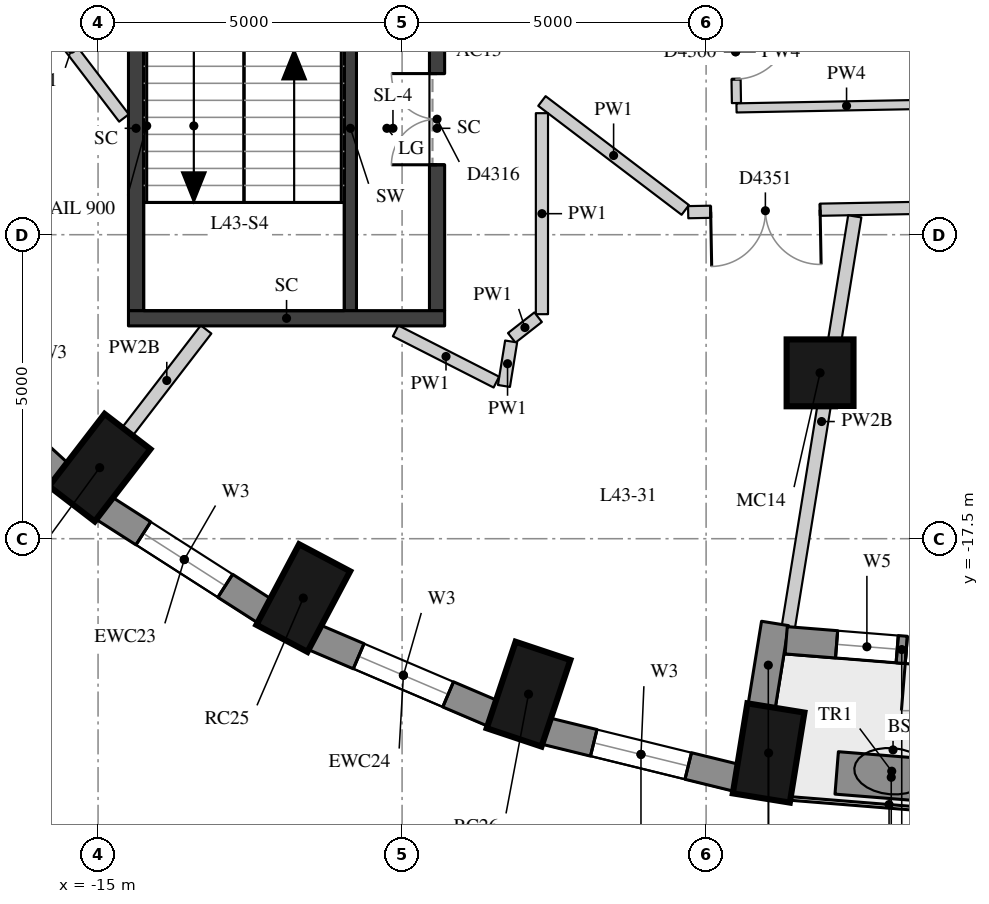
"""IFC4 building model, lengths in metres.
Left out: names, types, materials, properties, quantities, classifications, styles, units other than length and angle.
Written with IfcOpenShell. Run it as: python <this file> out.ifc"""

import sys

from ifc_helpers import new_model, si_unit, direction, frame, frame_2d, origin, origin_2d, place, context, subcontext, project, spatial, rectangle, extrude, element, fill, save


model = new_model("IFC4")
c1 = context("Model", 3, precision=1e-05, world=origin(), true_north=direction((0.0, 1.0)))
c2 = subcontext(c1, "Body", "Model", "MODEL_VIEW")
j1 = project(units=[si_unit("LENGTHUNIT", "METRE"), si_unit("PLANEANGLEUNIT", "RADIAN")], contexts=[c1])
p1 = place(None, origin())
s1 = spatial("IfcSite", under=j1, at=p1, CompositionType="ELEMENT")
p2 = place(p1, origin())
s2 = spatial("IfcBuilding", under=s1, at=p2, CompositionType="ELEMENT")
p3 = place(p2, frame((0.0, 0.0, 155.0)))
s3 = spatial("IfcBuildingStorey", under=s2, at=p3, CompositionType="ELEMENT", Elevation=155.0)
for number, where, z_axis, x_axis in (
    (1, (-14.973, -16.332, 0.0), (0.0, 0.0, 1.0), (-0.61, -0.792, 0.0)),
    (2, (-11.625, -18.476, 0.0), (0.0, 0.0, 1.0), (-0.468, -0.884, 0.0)),
    (3, (-7.92, -20.056, 0.0), (0.0, 0.0, 1.0), (-0.317, -0.949, 0.0)),
    (4, (-3.972, -21.024, 0.0), (0.0, 0.0, 1.0), (-0.16, -0.987, 0.0)),
):
    element("IfcColumn", number, at=place(p3, frame(where, z_axis=z_axis, x_axis=x_axis)), inside=s3, PredefinedType="COLUMN", context=c2, shape_type="SweptSolid", body=[
        extrude(rectangle(XDim=1.5, YDim=0.95, at=origin_2d()), origin(), (0.0, 0.0, 1.0), 3.3),
    ])
p4 = place(p3, frame((-3.126, -14.772, 0.0), z_axis=(0.0, 0.0, 1.0), x_axis=(1.0, 0.0, 0.0)))
e5 = element("IfcColumn", 5, at=p4, inside=s3, PredefinedType="COLUMN", context=c2, shape_type="SweptSolid", body=[
    extrude(rectangle(XDim=1.1, YDim=1.1, at=origin_2d()), origin(), (0.0, 0.0, 1.0), 3.3),
])
p5 = place(p3, frame((-17.913, -14.35, 0.0), z_axis=(0.0, 0.0, 1.0), x_axis=(0.737808755941, -0.675009807082, 0.0)))
e6 = element("IfcWall", 6, at=p5, inside=s3, PredefinedType="SOLIDWALL", context=c2, shape_type="SweptSolid", body=[
    extrude(rectangle(XDim=3.094, YDim=0.45, at=frame_2d((1.547, 0.0))), origin(), (0.0, 0.0, 1.0), 3.02),
])
p6 = place(p5, frame((0.747, 0.0, 0.4)))
e7 = element("IfcOpeningElement", 7, at=p6, cuts=e6, PredefinedType="OPENING", context=c2, shape_type="SweptSolid", body=[
    extrude(rectangle(XDim=1.6, YDim=1.75, at=frame_2d((0.8, 0.875))), frame((0.0, 0.235, 0.0), z_axis=(0.0, -1.0, 0.0), x_axis=(1.0, 0.0, 0.0)), (0.0, 0.0, 1.0), 0.47),
])
p7 = place(p3, frame((-14.908, -16.993, 0.0), z_axis=(0.0, 0.0, 1.0), x_axis=(0.842065914439, -0.539374633943, 0.0)))
e8 = element("IfcWall", 8, at=p7, inside=s3, PredefinedType="SOLIDWALL", context=c2, shape_type="SweptSolid", body=[
    extrude(rectangle(XDim=3.151, YDim=0.45, at=frame_2d((1.576, 0.0))), origin(), (0.0, 0.0, 1.0), 3.02),
])
p8 = place(p7, frame((0.776, 0.0, 0.4)))
e9 = element("IfcOpeningElement", 9, at=p8, cuts=e8, PredefinedType="OPENING", context=c2, shape_type="SweptSolid", body=[
    extrude(rectangle(XDim=1.6, YDim=1.75, at=frame_2d((0.8, 0.875))), frame((0.0, 0.235, 0.0), z_axis=(0.0, -1.0, 0.0), x_axis=(1.0, 0.0, 0.0)), (0.0, 0.0, 1.0), 0.47),
])
p9 = place(p3, frame((-11.45, -19.119, 0.0), z_axis=(0.0, 0.0, 1.0), x_axis=(0.919798725687, -0.392390499663, 0.0)))
e10 = element("IfcWall", 10, at=p9, inside=s3, PredefinedType="SOLIDWALL", context=c2, shape_type="SweptSolid", body=[
    extrude(rectangle(XDim=3.2, YDim=0.45, at=frame_2d((1.6, 0.0))), origin(), (0.0, 0.0, 1.0), 3.02),
])
p10 = place(p9, frame((0.8, 0.0, 0.4)))
e11 = element("IfcOpeningElement", 11, at=p10, cuts=e10, PredefinedType="OPENING", context=c2, shape_type="SweptSolid", body=[
    extrude(rectangle(XDim=1.6, YDim=1.75, at=frame_2d((0.8, 0.875))), frame((0.0, 0.235, 0.0), z_axis=(0.0, -1.0, 0.0), x_axis=(1.0, 0.0, 0.0)), (0.0, 0.0, 1.0), 0.47),
])
p11 = place(p3, frame((-7.643, -20.662, 0.0), z_axis=(0.0, 0.0, 1.0), x_axis=(0.971232901476, -0.238131583563, 0.0)))
e12 = element("IfcWall", 12, at=p11, inside=s3, PredefinedType="SOLIDWALL", context=c2, shape_type="SweptSolid", body=[
    extrude(rectangle(XDim=3.237, YDim=0.45, at=frame_2d((1.618, 0.0))), origin(), (0.0, 0.0, 1.0), 3.02),
])
p12 = place(p11, frame((0.818, 0.0, 0.4)))
e13 = element("IfcOpeningElement", 13, at=p12, cuts=e12, PredefinedType="OPENING", context=c2, shape_type="SweptSolid", body=[
    extrude(rectangle(XDim=1.6, YDim=1.75, at=frame_2d((0.8, 0.875))), frame((0.0, 0.235, 0.0), z_axis=(0.0, -1.0, 0.0), x_axis=(1.0, 0.0, 0.0)), (0.0, 0.0, 1.0), 0.47),
])
p13 = place(p3, frame((-4.088, -20.266, 0.0), z_axis=(0.0, 0.0, 1.0), x_axis=(0.159641024018, 0.98717513312, 0.0)))
e14 = element("IfcWall", 14, at=p13, inside=s3, PredefinedType="SOLIDWALL", context=c2, shape_type="SweptSolid", body=[
    extrude(rectangle(XDim=1.39, YDim=0.45, at=frame_2d((0.695, 0.0))), origin(), (0.0, 0.0, 1.0), 2.57),
])
p14 = place(p3, frame((-3.683, -19.171, 0.0), z_axis=(0.0, 0.0, 1.0), x_axis=(0.996792437449, -0.080030223316, 0.0)))
e15 = element("IfcWall", 15, at=p14, inside=s3, PredefinedType="SOLIDWALL", context=c2, shape_type="SweptSolid", body=[
    extrude(rectangle(XDim=3.813, YDim=0.45, at=frame_2d((1.907, 0.0))), origin(), (0.0, 0.0, 1.0), 3.02),
])
p15 = place(p14, frame((0.832, 0.0, 0.4)))
e16 = element("IfcOpeningElement", 16, at=p15, cuts=e15, PredefinedType="OPENING", context=c2, shape_type="SweptSolid", body=[
    extrude(rectangle(XDim=1.0, YDim=1.75, at=frame_2d((0.5, 0.875))), frame((0.0, 0.235, 0.0), z_axis=(0.0, -1.0, 0.0), x_axis=(1.0, 0.0, 0.0)), (0.0, 0.0, 1.0), 0.47),
])
p16 = place(p14, frame((1.982, 0.0, 0.0)))
e17 = element("IfcOpeningElement", 17, at=p16, cuts=e15, PredefinedType="OPENING", context=c2, shape_type="SweptSolid", body=[
    extrude(rectangle(XDim=1.0, YDim=2.15, at=frame_2d((0.5, 1.075))), frame((0.0, 0.235, 0.0), z_axis=(0.0, -1.0, 0.0), x_axis=(1.0, 0.0, 0.0)), (0.0, 0.0, 1.0), 0.47),
])
p17 = place(p3, frame((-2.852, -21.352, 0.0), z_axis=(0.0, 0.0, 1.0), x_axis=(0.996814415906, -0.07975600443, 0.0)))
e18 = element("IfcWall", 18, at=p17, inside=s3, PredefinedType="USERDEFINED", context=c2, shape_type="SweptSolid", body=[
    extrude(rectangle(XDim=1.8, YDim=0.7, at=frame_2d((0.9, 0.0))), origin(), (0.0, 0.0, 1.0), 0.75),
])
p18 = place(p3, frame((-10.85, -13.75, 0.0), z_axis=(0.0, 0.0, 1.0), x_axis=(0.0, 1.0, 0.0)))
e19 = element("IfcWall", 19, at=p18, inside=s3, PredefinedType="SHEAR", context=c2, shape_type="SweptSolid", body=[
    extrude(rectangle(XDim=6.0, YDim=0.2, at=frame_2d((3.0, 0.0))), origin(), (0.0, 0.0, 1.0), 3.02),
])
p19 = place(p18, frame((4.4, 0.0, 0.0)))
e20 = element("IfcOpeningElement", 20, at=p19, cuts=e19, PredefinedType="OPENING", context=c2, shape_type="SweptSolid", body=[
    extrude(rectangle(XDim=1.5, YDim=2.1, at=frame_2d((0.75, 1.05))), frame((0.0, 0.11, 0.0), z_axis=(0.0, -1.0, 0.0), x_axis=(1.0, 0.0, 0.0)), (0.0, 0.0, 1.0), 0.22),
])
p20 = place(p3, frame((-14.375, -13.75, -0.28), z_axis=(0.0, 0.0, 1.0), x_axis=(0.0, 1.0, 0.0)))
e21 = element("IfcWall", 21, at=p20, inside=s3, PredefinedType="SHEAR", context=c2, shape_type="SweptSolid", body=[
    extrude(rectangle(XDim=6.0, YDim=0.25, at=frame_2d((3.0, 0.0))), origin(), (0.0, 0.0, 1.0), 3.3),
])
p21 = place(p3, frame((-9.425, -13.75, -0.28), z_axis=(0.0, 0.0, 1.0), x_axis=(0.0, 1.0, 0.0)))
e22 = element("IfcWall", 22, at=p21, inside=s3, PredefinedType="SHEAR", context=c2, shape_type="SweptSolid", body=[
    extrude(rectangle(XDim=6.0, YDim=0.25, at=frame_2d((3.0, 0.0))), origin(), (0.0, 0.0, 1.0), 3.3),
])
p22 = place(p21, frame((2.4, 0.0, 0.28)))
e23 = element("IfcOpeningElement", 23, at=p22, cuts=e22, PredefinedType="OPENING", context=c2, shape_type="SweptSolid", body=[
    extrude(rectangle(XDim=1.5, YDim=2.1, at=frame_2d((0.75, 1.05))), frame((0.0, 0.135, 0.0), z_axis=(0.0, -1.0, 0.0), x_axis=(1.0, 0.0, 0.0)), (0.0, 0.0, 1.0), 0.27),
])
p23 = place(p3, frame((-14.5, -13.875, -0.28), z_axis=(0.0, 0.0, 1.0), x_axis=(1.0, 0.0, 0.0)))
e24 = element("IfcWall", 24, at=p23, inside=s3, PredefinedType="SHEAR", context=c2, shape_type="SweptSolid", body=[
    extrude(rectangle(XDim=5.2, YDim=0.25, at=frame_2d((2.6, 0.0))), origin(), (0.0, 0.0, 1.0), 3.3),
])
p24 = place(p3, frame((17.6, -11.702, 0.0), z_axis=(0.0, 0.0, 1.0), x_axis=(-0.999825923551, -0.018658043723, 0.0)))
e25 = element("IfcWall", 25, at=p24, inside=s3, PredefinedType="PARTITIONING", context=c2, shape_type="SweptSolid", body=[
    extrude(rectangle(XDim=22.899, YDim=0.2, at=frame_2d((11.449, 0.0))), origin(), (0.0, 0.0, 1.0), 3.02),
])
p25 = place(p24, frame((20.729, 0.0, 0.0)))
e26 = element("IfcOpeningElement", 26, at=p25, cuts=e25, PredefinedType="OPENING", context=c2, shape_type="SweptSolid", body=[
    extrude(rectangle(XDim=1.8, YDim=2.1, at=frame_2d((0.9, 1.05))), frame((0.0, 0.11, 0.0), z_axis=(0.0, -1.0, 0.0), x_axis=(1.0, 0.0, 0.0)), (0.0, 0.0, 1.0), 0.22),
])
p26 = place(p24, frame((14.554, 0.0, 0.0)))
e27 = element("IfcOpeningElement", 27, at=p26, cuts=e25, PredefinedType="OPENING", context=c2, shape_type="SweptSolid", body=[
    extrude(rectangle(XDim=1.1, YDim=2.1, at=frame_2d((0.55, 1.05))), frame((0.0, 0.11, 0.0), z_axis=(0.0, -1.0, 0.0), x_axis=(1.0, 0.0, 0.0)), (0.0, 0.0, 1.0), 0.22),
])
p27 = place(p24, frame((8.491, 0.0, 0.0)))
e28 = element("IfcOpeningElement", 28, at=p27, cuts=e25, PredefinedType="OPENING", context=c2, shape_type="SweptSolid", body=[
    extrude(rectangle(XDim=1.1, YDim=2.1, at=frame_2d((0.55, 1.05))), frame((0.0, 0.11, 0.0), z_axis=(0.0, -1.0, 0.0), x_axis=(1.0, 0.0, 0.0)), (0.0, 0.0, 1.0), 0.22),
])
p28 = place(p3, frame((-5.343, -12.093, 0.0), z_axis=(0.0, 0.0, 1.0), x_axis=(-0.796104996328, 0.605158520407, 0.0)))
e29 = element("IfcWall", 29, at=p28, inside=s3, PredefinedType="PARTITIONING", context=c2, shape_type="SweptSolid", body=[
    extrude(rectangle(XDim=2.961, YDim=0.2, at=frame_2d((1.48, 0.0))), origin(), (0.0, 0.0, 1.0), 3.02),
])
p29 = place(p3, frame((-7.7, -10.501, 0.0), z_axis=(0.0, 0.0, 1.0), x_axis=(0.0, -1.0, 0.0)))
e30 = element("IfcWall", 30, at=p29, inside=s3, PredefinedType="PARTITIONING", context=c2, shape_type="SweptSolid", body=[
    extrude(rectangle(XDim=3.306, YDim=0.2, at=frame_2d((1.653, 0.0))), origin(), (0.0, 0.0, 1.0), 3.02),
])
p30 = place(p3, frame((-7.762, -13.857, 0.0), z_axis=(0.0, 0.0, 1.0), x_axis=(-0.787561048704, -0.616236638447, 0.0)))
e31 = element("IfcWall", 31, at=p30, inside=s3, PredefinedType="PARTITIONING", context=c2, shape_type="SweptSolid", body=[
    extrude(rectangle(XDim=0.552, YDim=0.2, at=frame_2d((0.276, 0.0))), origin(), (0.0, 0.0, 1.0), 3.02),
])
p31 = place(p3, frame((-8.206, -14.256, 0.0), z_axis=(0.0, 0.0, 1.0), x_axis=(-0.159750207899, -0.987157470253, 0.0)))
e32 = element("IfcWall", 32, at=p31, inside=s3, PredefinedType="PARTITIONING", context=c2, shape_type="SweptSolid", body=[
    extrude(rectangle(XDim=0.741, YDim=0.2, at=frame_2d((0.371, 0.0))), origin(), (0.0, 0.0, 1.0), 3.02),
])
p32 = place(p3, frame((-8.449, -14.925, 0.0), z_axis=(0.0, 0.0, 1.0), x_axis=(-0.891172770552, 0.45366407509, 0.0)))
e33 = element("IfcWall", 33, at=p32, inside=s3, PredefinedType="PARTITIONING", context=c2, shape_type="SweptSolid", body=[
    extrude(rectangle(XDim=1.859, YDim=0.2, at=frame_2d((0.929, 0.0))), origin(), (0.0, 0.0, 1.0), 3.02),
])
p33 = place(p3, frame((-14.574, -10.58, 0.0), z_axis=(0.0, 0.0, 1.0), x_axis=(-0.606733250298, 0.794905505694, 0.0)))
e34 = element("IfcWall", 34, at=p33, inside=s3, PredefinedType="PARTITIONING", context=c2, shape_type="SweptSolid", body=[
    extrude(rectangle(XDim=2.845, YDim=0.2, at=frame_2d((1.423, 0.0))), origin(), (0.0, 0.0, 1.0), 3.02),
])
p34 = place(p33, frame((1.805, 0.0, 0.0)))
e35 = element("IfcOpeningElement", 35, at=p34, cuts=e34, PredefinedType="OPENING", context=c2, shape_type="SweptSolid", body=[
    extrude(rectangle(XDim=0.9, YDim=2.1, at=frame_2d((0.45, 1.05))), frame((0.0, 0.11, 0.0), z_axis=(0.0, -1.0, 0.0), x_axis=(1.0, 0.0, 0.0)), (0.0, 0.0, 1.0), 0.22),
])
p35 = place(p3, frame((-0.88, -10.347, 0.0), z_axis=(0.0, 0.0, 1.0), x_axis=(-0.999826791681, -0.018611465199, 0.0)))
e36 = element("IfcWall", 36, at=p35, inside=s3, PredefinedType="PARTITIONING", context=c2, shape_type="SweptSolid", body=[
    extrude(rectangle(XDim=3.621, YDim=0.15, at=frame_2d((1.81, 0.0))), origin(), (0.0, 0.0, 1.0), 3.02),
])
p36 = place(p3, frame((-4.501, -10.334, 0.0), z_axis=(0.0, 0.0, 1.0), x_axis=(-0.015785981736, 0.999875393627, 0.0)))
e37 = element("IfcWall", 37, at=p36, inside=s3, PredefinedType="PARTITIONING", context=c2, shape_type="SweptSolid", body=[
    extrude(rectangle(XDim=1.686, YDim=0.15, at=frame_2d((0.843, 0.0))), origin(), (0.0, 0.0, 1.0), 3.02),
])
p37 = place(p36, frame((0.393, 0.0, 0.0)))
e38 = element("IfcOpeningElement", 38, at=p37, cuts=e37, PredefinedType="OPENING", context=c2, shape_type="SweptSolid", body=[
    extrude(rectangle(XDim=0.9, YDim=2.1, at=frame_2d((0.45, 1.05))), frame((0.0, 0.085, 0.0), z_axis=(0.0, -1.0, 0.0), x_axis=(1.0, 0.0, 0.0)), (0.0, 0.0, 1.0), 0.17),
])
p38 = place(p3, frame((-14.516, -15.737, 0.0), z_axis=(0.0, 0.0, 1.0), x_axis=(0.609983624648, 0.792414019097, 0.0)))
e39 = element("IfcWall", 39, at=p38, inside=s3, PredefinedType="PARTITIONING", context=c2, shape_type="SweptSolid", body=[
    extrude(rectangle(XDim=2.118, YDim=0.22, at=frame_2d((1.059, 0.0))), origin(), (0.0, 0.0, 1.0), 2.57),
])
p39 = place(p3, frame((-3.647, -18.948, 0.0), z_axis=(0.0, 0.0, 1.0), x_axis=(0.159718523375, 0.98716259719, 0.0)))
e40 = element("IfcWall", 40, at=p39, inside=s3, PredefinedType="PARTITIONING", context=c2, shape_type="SweptSolid", body=[
    extrude(rectangle(XDim=6.837, YDim=0.22, at=frame_2d((3.419, 0.0))), origin(), (0.0, 0.0, 1.0), 2.57),
])
p40 = place(p8, origin())
e41 = element("IfcWindow", 41, at=p40, inside=s3, PartitioningType="SINGLE_PANEL", PredefinedType="WINDOW", context=c2, shape_type="SweptSolid", body=[
    extrude(rectangle(XDim=1.6, YDim=1.75, at=frame_2d((0.8, 0.875))), frame((0.0, 0.035, 0.0), z_axis=(0.0, -1.0, 0.0), x_axis=(1.0, 0.0, 0.0)), (0.0, 0.0, 1.0), 0.06),
])
fill(e9, e41)
p41 = place(p10, origin())
e42 = element("IfcWindow", 42, at=p41, inside=s3, PartitioningType="SINGLE_PANEL", PredefinedType="WINDOW", context=c2, shape_type="SweptSolid", body=[
    extrude(rectangle(XDim=1.6, YDim=1.75, at=frame_2d((0.8, 0.875))), frame((0.0, 0.035, 0.0), z_axis=(0.0, -1.0, 0.0), x_axis=(1.0, 0.0, 0.0)), (0.0, 0.0, 1.0), 0.06),
])
fill(e11, e42)
p42 = place(p12, origin())
e43 = element("IfcWindow", 43, at=p42, inside=s3, PartitioningType="SINGLE_PANEL", PredefinedType="WINDOW", context=c2, shape_type="SweptSolid", body=[
    extrude(rectangle(XDim=1.6, YDim=1.75, at=frame_2d((0.8, 0.875))), frame((0.0, 0.035, 0.0), z_axis=(0.0, -1.0, 0.0), x_axis=(1.0, 0.0, 0.0)), (0.0, 0.0, 1.0), 0.06),
])
fill(e13, e43)
p43 = place(p15, origin())
e44 = element("IfcWindow", 44, at=p43, inside=s3, PartitioningType="SINGLE_PANEL", PredefinedType="WINDOW", context=c2, shape_type="SweptSolid", body=[
    extrude(rectangle(XDim=1.0, YDim=1.75, at=frame_2d((0.5, 0.875))), frame((0.0, 0.035, 0.0), z_axis=(0.0, -1.0, 0.0), x_axis=(1.0, 0.0, 0.0)), (0.0, 0.0, 1.0), 0.06),
])
fill(e16, e44)
p44 = place(p16, frame((1.0, 0.0, 0.0), z_axis=(0.0, 0.0, 1.0), x_axis=(-1.0, 0.0, 0.0)))
e45 = element("IfcDoor", 45, at=p44, inside=s3, OperationType="SINGLE_SWING_RIGHT", PredefinedType="DOOR", context=c2, shape_type="SweptSolid", body=[
    extrude(rectangle(XDim=1.0, YDim=2.15, at=frame_2d((0.5, 1.075))), frame((0.0, 0.075, 0.0), z_axis=(0.0, -1.0, 0.0), x_axis=(1.0, 0.0, 0.0)), (0.0, 0.0, 1.0), 0.05),
])
fill(e17, e45)
p45 = place(p22, origin())
e46 = element("IfcDoor", 46, at=p45, inside=s3, OperationType="DOUBLE_DOOR_SINGLE_SWING", PredefinedType="DOOR", context=c2, shape_type="SweptSolid", body=[
    extrude(rectangle(XDim=1.5, YDim=2.1, at=frame_2d((0.75, 1.05))), frame((0.0, 0.025, 0.0), z_axis=(0.0, -1.0, 0.0), x_axis=(1.0, 0.0, 0.0)), (0.0, 0.0, 1.0), 0.05),
])
fill(e23, e46)
p46 = place(p25, origin())
e47 = element("IfcDoor", 47, at=p46, inside=s3, OperationType="DOUBLE_DOOR_SINGLE_SWING", PredefinedType="DOOR", context=c2, shape_type="SweptSolid", body=[
    extrude(rectangle(XDim=1.8, YDim=2.1, at=frame_2d((0.9, 1.05))), frame((0.0, 0.025, 0.0), z_axis=(0.0, -1.0, 0.0), x_axis=(1.0, 0.0, 0.0)), (0.0, 0.0, 1.0), 0.05),
])
fill(e26, e47)
p47 = place(p37, origin())
e48 = element("IfcDoor", 48, at=p47, inside=s3, OperationType="SINGLE_SWING_LEFT", PredefinedType="DOOR", context=c2, shape_type="SweptSolid", body=[
    extrude(rectangle(XDim=0.9, YDim=2.1, at=frame_2d((0.45, 1.05))), frame((0.0, 0.025, 0.0), z_axis=(0.0, -1.0, 0.0), x_axis=(1.0, 0.0, 0.0)), (0.0, 0.0, 1.0), 0.05),
])
fill(e38, e48)
save(model, sys.argv[1])
